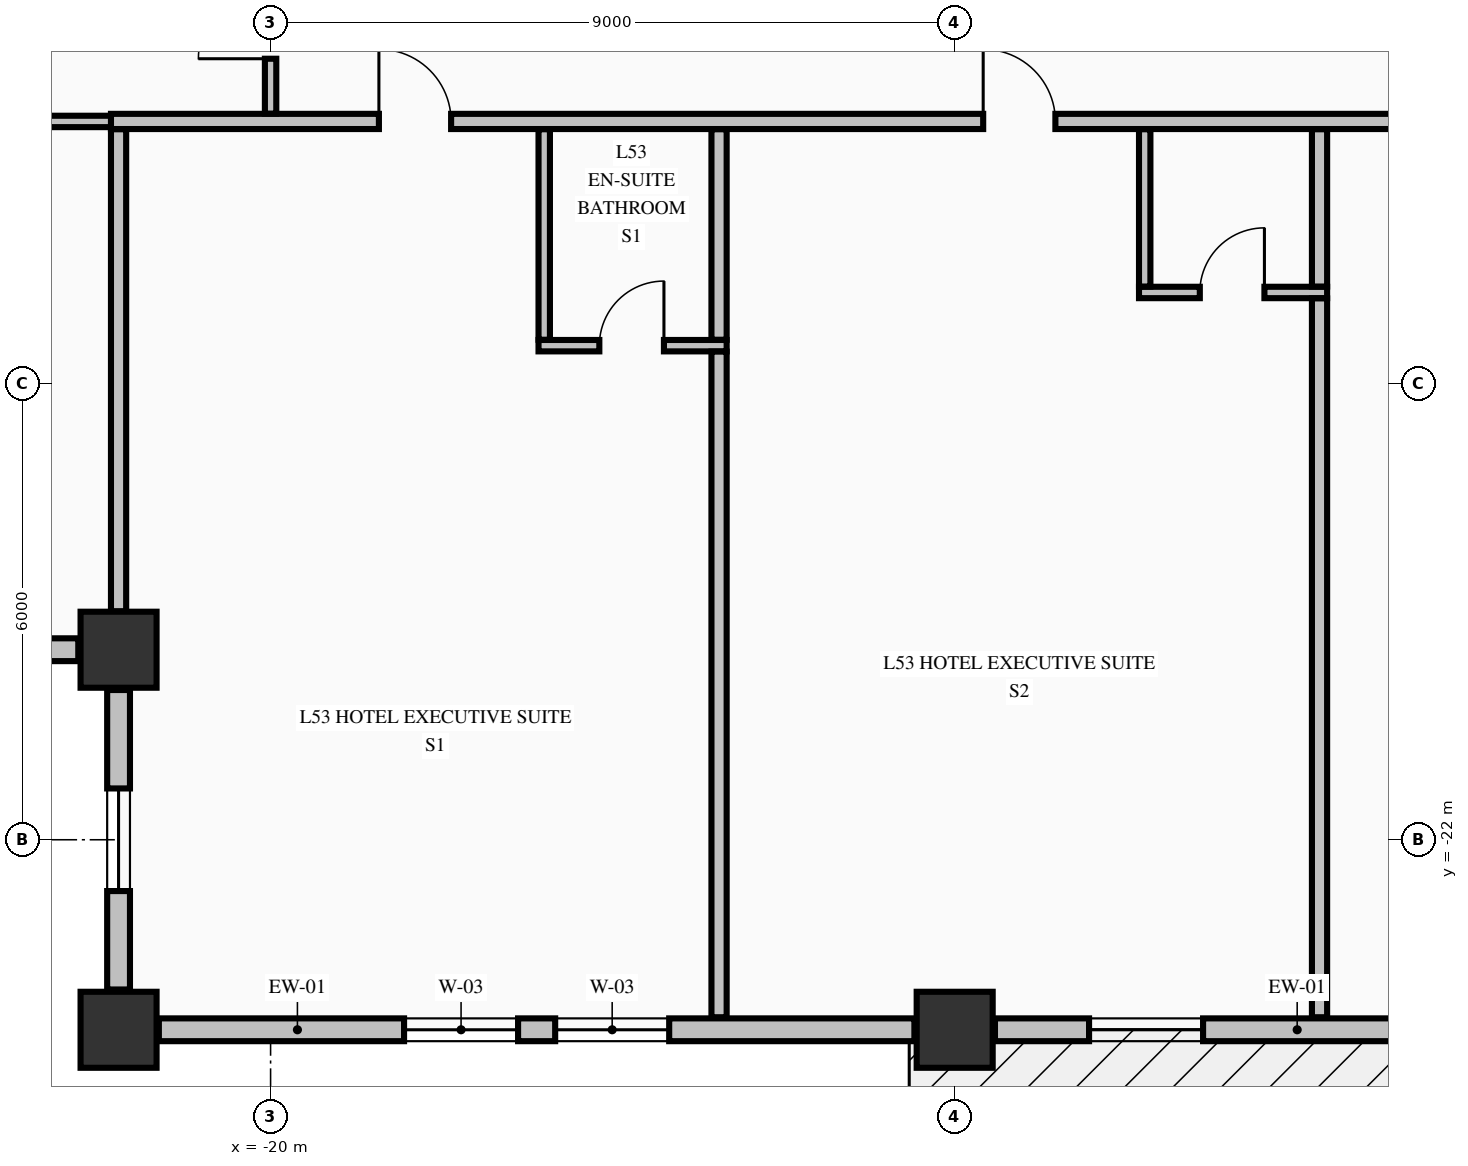
"""IFC4 building model, lengths in metres.
Left out: names, types, materials, properties, quantities, classifications, styles, units other than length and angle.
Written with IfcOpenShell. Run it as: python <this file> out.ifc"""

import sys

from ifc_helpers import new_model, si_unit, direction, frame, frame_2d, origin, origin_2d, place, context, subcontext, project, spatial, rectangle, extrude, element, fill, save


model = new_model("IFC4")
c1 = context("Model", 3, precision=1e-05, world=origin(), true_north=direction((0.0, 1.0)))
c2 = subcontext(c1, "Body", "Model", "MODEL_VIEW")
j1 = project(units=[si_unit("LENGTHUNIT", "METRE"), si_unit("PLANEANGLEUNIT", "RADIAN")], contexts=[c1])
p1 = place(None, origin())
s1 = spatial("IfcSite", under=j1, at=p1, CompositionType="ELEMENT")
p2 = place(p1, origin())
s2 = spatial("IfcBuilding", under=s1, at=p2, CompositionType="ELEMENT")
p3 = place(p2, frame((0.0, 0.0, 205.06)))
s3 = spatial("IfcBuildingStorey", under=s2, at=p3, CompositionType="ELEMENT", Elevation=205.06)
for number, where, z_axis, x_axis in (
    (1, (-22.0, -24.5, -0.25), (0.0, 0.0, 1.0), (1.0, 0.0, 0.0)),
    (2, (-11.0, -24.5, -0.25), (0.0, 0.0, 1.0), (1.0, 0.0, 0.0)),
    (3, (-22.0, -19.5, -0.25), (0.0, 0.0, 1.0), (1.0, 0.0, 0.0)),
):
    element("IfcColumn", number, at=place(p3, frame(where, z_axis=z_axis, x_axis=x_axis)), inside=s3, PredefinedType="COLUMN", context=c2, shape_type="SweptSolid", body=[
        extrude(rectangle(XDim=1.0, YDim=1.0, at=origin_2d()), origin(), (0.0, 0.0, 1.0), 3.4),
    ])
p4 = place(p3, frame((-26.47, -19.5, 0.0), z_axis=(0.0, 0.0, 1.0), x_axis=(1.0, 0.0, 0.0)))
e4 = element("IfcWall", 4, at=p4, inside=s3, PredefinedType="STANDARD", context=c2, shape_type="SweptSolid", body=[
    extrude(rectangle(XDim=3.94, YDim=0.3, at=frame_2d((1.97, 0.0))), origin(), (0.0, 0.0, 1.0), 2.542),
])
p5 = place(p4, frame((1.295, 0.0, 0.68)))
e5 = element("IfcOpeningElement", 5, at=p5, cuts=e4, PredefinedType="OPENING", context=c2, shape_type="SweptSolid", body=[
    extrude(rectangle(XDim=1.35, YDim=1.42, at=frame_2d((0.675, 0.71))), frame((0.0, 0.16, 0.0), z_axis=(0.0, -1.0, 0.0), x_axis=(1.0, 0.0, 0.0)), (0.0, 0.0, 1.0), 0.32),
])
p6 = place(p3, frame((-22.0, -20.03, 0.0), z_axis=(0.0, 0.0, 1.0), x_axis=(0.0, -1.0, 0.0)))
e6 = element("IfcWall", 6, at=p6, inside=s3, PredefinedType="STANDARD", context=c2, shape_type="SweptSolid", body=[
    extrude(rectangle(XDim=3.94, YDim=0.3, at=frame_2d((1.97, 0.0))), origin(), (0.0, 0.0, 1.0), 2.542),
])
p7 = place(p6, frame((1.295, 0.0, 0.68)))
e7 = element("IfcOpeningElement", 7, at=p7, cuts=e6, PredefinedType="OPENING", context=c2, shape_type="SweptSolid", body=[
    extrude(rectangle(XDim=1.35, YDim=1.42, at=frame_2d((0.675, 0.71))), frame((0.0, 0.16, 0.0), z_axis=(0.0, -1.0, 0.0), x_axis=(1.0, 0.0, 0.0)), (0.0, 0.0, 1.0), 0.32),
])
p8 = place(p3, frame((-21.47, -24.5, 0.0), z_axis=(0.0, 0.0, 1.0), x_axis=(1.0, 0.0, 0.0)))
e8 = element("IfcWall", 8, at=p8, inside=s3, PredefinedType="STANDARD", context=c2, shape_type="SweptSolid", body=[
    extrude(rectangle(XDim=9.94, YDim=0.3, at=frame_2d((4.97, 0.0))), origin(), (0.0, 0.0, 1.0), 2.542),
])
p9 = place(p8, frame((3.226, 0.0, 0.72)))
e9 = element("IfcOpeningElement", 9, at=p9, cuts=e8, PredefinedType="OPENING", context=c2, shape_type="SweptSolid", body=[
    extrude(rectangle(XDim=1.5, YDim=1.6, at=frame_2d((0.75, 0.8))), frame((0.0, 0.16, 0.0), z_axis=(0.0, -1.0, 0.0), x_axis=(1.0, 0.0, 0.0)), (0.0, 0.0, 1.0), 0.32),
])
p10 = place(p8, frame((5.214, 0.0, 0.72)))
e10 = element("IfcOpeningElement", 10, at=p10, cuts=e8, PredefinedType="OPENING", context=c2, shape_type="SweptSolid", body=[
    extrude(rectangle(XDim=1.5, YDim=1.6, at=frame_2d((0.75, 0.8))), frame((0.0, 0.16, 0.0), z_axis=(0.0, -1.0, 0.0), x_axis=(1.0, 0.0, 0.0)), (0.0, 0.0, 1.0), 0.32),
])
p11 = place(p3, frame((-10.47, -24.5, 0.0), z_axis=(0.0, 0.0, 1.0), x_axis=(1.0, 0.0, 0.0)))
e11 = element("IfcWall", 11, at=p11, inside=s3, PredefinedType="STANDARD", context=c2, shape_type="SweptSolid", body=[
    extrude(rectangle(XDim=9.94, YDim=0.3, at=frame_2d((4.97, 0.0))), origin(), (0.0, 0.0, 1.0), 2.542),
])
p12 = place(p11, frame((8.64, 0.0, 0.0)))
e12 = element("IfcOpeningElement", 12, at=p12, cuts=e11, PredefinedType="OPENING", context=c2, shape_type="SweptSolid", body=[
    extrude(rectangle(XDim=1.1, YDim=2.15, at=frame_2d((0.55, 1.075))), frame((0.0, 0.16, 0.0), z_axis=(0.0, -1.0, 0.0), x_axis=(1.0, 0.0, 0.0)), (0.0, 0.0, 1.0), 0.32),
])
p13 = place(p11, frame((1.238, 0.0, 0.72)))
e13 = element("IfcOpeningElement", 13, at=p13, cuts=e11, PredefinedType="OPENING", context=c2, shape_type="SweptSolid", body=[
    extrude(rectangle(XDim=1.5, YDim=1.6, at=frame_2d((0.75, 0.8))), frame((0.0, 0.16, 0.0), z_axis=(0.0, -1.0, 0.0), x_axis=(1.0, 0.0, 0.0)), (0.0, 0.0, 1.0), 0.32),
])
p14 = place(p11, frame((5.214, 0.0, 0.72)))
e14 = element("IfcOpeningElement", 14, at=p14, cuts=e11, PredefinedType="OPENING", context=c2, shape_type="SweptSolid", body=[
    extrude(rectangle(XDim=1.5, YDim=1.6, at=frame_2d((0.75, 0.8))), frame((0.0, 0.16, 0.0), z_axis=(0.0, -1.0, 0.0), x_axis=(1.0, 0.0, 0.0)), (0.0, 0.0, 1.0), 0.32),
])
p15 = place(p3, frame((-16.475, -15.5, 0.0), z_axis=(0.0, 0.0, 1.0), x_axis=(1.0, 0.0, 0.0)))
e15 = element("IfcWall", 15, at=p15, inside=s3, PredefinedType="PARTITIONING", context=c2, shape_type="SweptSolid", body=[
    extrude(rectangle(XDim=2.475, YDim=0.15, at=frame_2d((1.238, 0.0))), origin(), (0.0, 0.0, 1.0), 3.15),
])
p16 = place(p15, frame((0.8, 0.0, 0.0)))
e16 = element("IfcOpeningElement", 16, at=p16, cuts=e15, PredefinedType="OPENING", context=c2, shape_type="SweptSolid", body=[
    extrude(rectangle(XDim=0.85, YDim=2.1, at=frame_2d((0.425, 1.05))), frame((0.0, 0.085, 0.0), z_axis=(0.0, -1.0, 0.0), x_axis=(1.0, 0.0, 0.0)), (0.0, 0.0, 1.0), 0.17),
])
p17 = place(p3, frame((-8.575, -14.8, 0.0), z_axis=(0.0, 0.0, 1.0), x_axis=(1.0, 0.0, 0.0)))
e17 = element("IfcWall", 17, at=p17, inside=s3, PredefinedType="PARTITIONING", context=c2, shape_type="SweptSolid", body=[
    extrude(rectangle(XDim=2.475, YDim=0.15, at=frame_2d((1.237, 0.0))), origin(), (0.0, 0.0, 1.0), 3.15),
])
p18 = place(p17, frame((0.8, 0.0, 0.0)))
e18 = element("IfcOpeningElement", 18, at=p18, cuts=e17, PredefinedType="OPENING", context=c2, shape_type="SweptSolid", body=[
    extrude(rectangle(XDim=0.85, YDim=2.1, at=frame_2d((0.425, 1.05))), frame((0.0, 0.085, 0.0), z_axis=(0.0, -1.0, 0.0), x_axis=(1.0, 0.0, 0.0)), (0.0, 0.0, 1.0), 0.17),
])
p19 = place(p3, frame((-26.835, -12.55, 0.0), z_axis=(0.0, 0.0, 1.0), x_axis=(1.0, 0.0, 0.0)))
e19 = element("IfcWall", 19, at=p19, inside=s3, PredefinedType="PARTITIONING", context=c2, shape_type="SweptSolid", body=[
    extrude(rectangle(XDim=4.935, YDim=0.15, at=frame_2d((2.468, 0.0))), origin(), (0.0, 0.0, 1.0), 3.15),
])
p20 = place(p3, frame((-22.1, -12.55, 0.0), z_axis=(0.0, 0.0, 1.0), x_axis=(1.0, 0.0, 0.0)))
e20 = element("IfcWall", 20, at=p20, inside=s3, PredefinedType="PARTITIONING", context=c2, shape_type="SweptSolid", body=[
    extrude(rectangle(XDim=39.2, YDim=0.2, at=frame_2d((19.6, 0.0))), origin(), (0.0, 0.0, 1.0), 3.15),
])
p21 = place(p20, frame((3.525, 0.0, 0.0)))
e21 = element("IfcOpeningElement", 21, at=p21, cuts=e20, PredefinedType="OPENING", context=c2, shape_type="SweptSolid", body=[
    extrude(rectangle(XDim=0.95, YDim=2.15, at=frame_2d((0.475, 1.075))), frame((0.0, 0.11, 0.0), z_axis=(0.0, -1.0, 0.0), x_axis=(1.0, 0.0, 0.0)), (0.0, 0.0, 1.0), 0.22),
])
p22 = place(p20, frame((11.475, 0.0, 0.0)))
e22 = element("IfcOpeningElement", 22, at=p22, cuts=e20, PredefinedType="OPENING", context=c2, shape_type="SweptSolid", body=[
    extrude(rectangle(XDim=0.95, YDim=2.15, at=frame_2d((0.475, 1.075))), frame((0.0, 0.11, 0.0), z_axis=(0.0, -1.0, 0.0), x_axis=(1.0, 0.0, 0.0)), (0.0, 0.0, 1.0), 0.22),
])
p23 = place(p20, frame((19.775, 0.0, 0.0)))
e23 = element("IfcOpeningElement", 23, at=p23, cuts=e20, PredefinedType="OPENING", context=c2, shape_type="SweptSolid", body=[
    extrude(rectangle(XDim=0.95, YDim=2.15, at=frame_2d((0.475, 1.075))), frame((0.0, 0.11, 0.0), z_axis=(0.0, -1.0, 0.0), x_axis=(1.0, 0.0, 0.0)), (0.0, 0.0, 1.0), 0.22),
])
p24 = place(p20, frame((34.675, 0.0, 0.0)))
e24 = element("IfcOpeningElement", 24, at=p24, cuts=e20, PredefinedType="OPENING", context=c2, shape_type="SweptSolid", body=[
    extrude(rectangle(XDim=0.95, YDim=2.15, at=frame_2d((0.475, 1.075))), frame((0.0, 0.11, 0.0), z_axis=(0.0, -1.0, 0.0), x_axis=(1.0, 0.0, 0.0)), (0.0, 0.0, 1.0), 0.22),
])
p25 = place(p3, frame((-22.0, -18.994, 0.0), z_axis=(0.0, 0.0, 1.0), x_axis=(0.0, 1.0, 0.0)))
e25 = element("IfcWall", 25, at=p25, inside=s3, PredefinedType="PARTITIONING", context=c2, shape_type="SweptSolid", body=[
    extrude(rectangle(XDim=6.341, YDim=0.2, at=frame_2d((3.17, 0.0))), origin(), (0.0, 0.0, 1.0), 3.15),
])
p26 = place(p3, frame((-20.0, -12.447, 0.0), z_axis=(0.0, 0.0, 1.0), x_axis=(0.0, 1.0, 0.0)))
e26 = element("IfcWall", 26, at=p26, inside=s3, PredefinedType="PARTITIONING", context=c2, shape_type="SweptSolid", body=[
    extrude(rectangle(XDim=2.066, YDim=0.15, at=frame_2d((1.033, 0.0))), origin(), (0.0, 0.0, 1.0), 2.342),
])
p27 = place(p26, frame((0.722, 0.0, 0.0)))
e27 = element("IfcOpeningElement", 27, at=p27, cuts=e26, PredefinedType="OPENING", context=c2, shape_type="SweptSolid", body=[
    extrude(rectangle(XDim=0.95, YDim=2.15, at=frame_2d((0.475, 1.075))), frame((0.0, 0.085, 0.0), z_axis=(0.0, -1.0, 0.0), x_axis=(1.0, 0.0, 0.0)), (0.0, 0.0, 1.0), 0.17),
])
p28 = place(p3, frame((-16.4, -15.422, 0.0), z_axis=(0.0, 0.0, 1.0), x_axis=(0.0, 1.0, 0.0)))
e28 = element("IfcWall", 28, at=p28, inside=s3, PredefinedType="PARTITIONING", context=c2, shape_type="SweptSolid", body=[
    extrude(rectangle(XDim=2.769, YDim=0.15, at=frame_2d((1.385, 0.0))), origin(), (0.0, 0.0, 1.0), 3.15),
])
p29 = place(p3, frame((-14.1, -24.335, 0.0), z_axis=(0.0, 0.0, 1.0), x_axis=(0.0, 1.0, 0.0)))
e29 = element("IfcWall", 29, at=p29, inside=s3, PredefinedType="PARTITIONING", context=c2, shape_type="SweptSolid", body=[
    extrude(rectangle(XDim=8.757, YDim=0.2, at=frame_2d((4.378, 0.0))), origin(), (0.0, 0.0, 1.0), 3.15),
])
p30 = place(p3, frame((-14.1, -15.422, 0.0), z_axis=(0.0, 0.0, 1.0), x_axis=(0.0, 1.0, 0.0)))
e30 = element("IfcWall", 30, at=p30, inside=s3, PredefinedType="PARTITIONING", context=c2, shape_type="SweptSolid", body=[
    extrude(rectangle(XDim=2.769, YDim=0.2, at=frame_2d((1.385, 0.0))), origin(), (0.0, 0.0, 1.0), 3.15),
])
p31 = place(p3, frame((-8.5, -14.722, 0.0), z_axis=(0.0, 0.0, 1.0), x_axis=(0.0, 1.0, 0.0)))
e31 = element("IfcWall", 31, at=p31, inside=s3, PredefinedType="PARTITIONING", context=c2, shape_type="SweptSolid", body=[
    extrude(rectangle(XDim=2.069, YDim=0.15, at=frame_2d((1.034, 0.0))), origin(), (0.0, 0.0, 1.0), 3.15),
])
p32 = place(p3, frame((-6.2, -24.335, 0.0), z_axis=(0.0, 0.0, 1.0), x_axis=(0.0, 1.0, 0.0)))
e32 = element("IfcWall", 32, at=p32, inside=s3, PredefinedType="PARTITIONING", context=c2, shape_type="SweptSolid", body=[
    extrude(rectangle(XDim=9.457, YDim=0.2, at=frame_2d((4.729, 0.0))), origin(), (0.0, 0.0, 1.0), 3.15),
])
p33 = place(p3, frame((-6.2, -14.722, 0.0), z_axis=(0.0, 0.0, 1.0), x_axis=(0.0, 1.0, 0.0)))
e33 = element("IfcWall", 33, at=p33, inside=s3, PredefinedType="PARTITIONING", context=c2, shape_type="SweptSolid", body=[
    extrude(rectangle(XDim=2.069, YDim=0.2, at=frame_2d((1.034, 0.0))), origin(), (0.0, 0.0, 1.0), 3.15),
])
p34 = place(p7, origin())
e34 = element("IfcWindow", 34, at=p34, inside=s3, PartitioningType="SINGLE_PANEL", PredefinedType="WINDOW", context=c2, shape_type="SweptSolid", body=[
    extrude(rectangle(XDim=1.35, YDim=1.42, at=frame_2d((0.675, 0.71))), frame((0.0, 0.03, 0.0), z_axis=(0.0, -1.0, 0.0), x_axis=(1.0, 0.0, 0.0)), (0.0, 0.0, 1.0), 0.06),
])
fill(e7, e34)
p35 = place(p9, origin())
e35 = element("IfcWindow", 35, at=p35, inside=s3, PartitioningType="SINGLE_PANEL", PredefinedType="WINDOW", context=c2, shape_type="SweptSolid", body=[
    extrude(rectangle(XDim=1.5, YDim=1.6, at=frame_2d((0.75, 0.8))), frame((0.0, 0.03, 0.0), z_axis=(0.0, -1.0, 0.0), x_axis=(1.0, 0.0, 0.0)), (0.0, 0.0, 1.0), 0.06),
])
fill(e9, e35)
p36 = place(p10, origin())
e36 = element("IfcWindow", 36, at=p36, inside=s3, PartitioningType="SINGLE_PANEL", PredefinedType="WINDOW", context=c2, shape_type="SweptSolid", body=[
    extrude(rectangle(XDim=1.5, YDim=1.6, at=frame_2d((0.75, 0.8))), frame((0.0, 0.03, 0.0), z_axis=(0.0, -1.0, 0.0), x_axis=(1.0, 0.0, 0.0)), (0.0, 0.0, 1.0), 0.06),
])
fill(e10, e36)
p37 = place(p13, origin())
e37 = element("IfcWindow", 37, at=p37, inside=s3, PartitioningType="SINGLE_PANEL", PredefinedType="WINDOW", context=c2, shape_type="SweptSolid", body=[
    extrude(rectangle(XDim=1.5, YDim=1.6, at=frame_2d((0.75, 0.8))), frame((0.0, 0.03, 0.0), z_axis=(0.0, -1.0, 0.0), x_axis=(1.0, 0.0, 0.0)), (0.0, 0.0, 1.0), 0.06),
])
fill(e13, e37)
p38 = place(p21, origin())
e38 = element("IfcDoor", 38, at=p38, inside=s3, OperationType="SINGLE_SWING_LEFT", PredefinedType="DOOR", context=c2, shape_type="SweptSolid", body=[
    extrude(rectangle(XDim=0.95, YDim=2.15, at=frame_2d((0.475, 1.075))), frame((0.0, 0.025, 0.0), z_axis=(0.0, -1.0, 0.0), x_axis=(1.0, 0.0, 0.0)), (0.0, 0.0, 1.0), 0.05),
])
fill(e21, e38)
p39 = place(p16, origin())
e39 = element("IfcDoor", 39, at=p39, inside=s3, OperationType="SINGLE_SWING_RIGHT", PredefinedType="DOOR", context=c2, shape_type="SweptSolid", body=[
    extrude(rectangle(XDim=0.85, YDim=2.1, at=frame_2d((0.425, 1.05))), frame((0.0, 0.025, 0.0), z_axis=(0.0, -1.0, 0.0), x_axis=(1.0, 0.0, 0.0)), (0.0, 0.0, 1.0), 0.05),
])
fill(e16, e39)
p40 = place(p22, origin())
e40 = element("IfcDoor", 40, at=p40, inside=s3, OperationType="SINGLE_SWING_LEFT", PredefinedType="DOOR", context=c2, shape_type="SweptSolid", body=[
    extrude(rectangle(XDim=0.95, YDim=2.15, at=frame_2d((0.475, 1.075))), frame((0.0, 0.025, 0.0), z_axis=(0.0, -1.0, 0.0), x_axis=(1.0, 0.0, 0.0)), (0.0, 0.0, 1.0), 0.05),
])
fill(e22, e40)
p41 = place(p18, origin())
e41 = element("IfcDoor", 41, at=p41, inside=s3, OperationType="SINGLE_SWING_RIGHT", PredefinedType="DOOR", context=c2, shape_type="SweptSolid", body=[
    extrude(rectangle(XDim=0.85, YDim=2.1, at=frame_2d((0.425, 1.05))), frame((0.0, 0.025, 0.0), z_axis=(0.0, -1.0, 0.0), x_axis=(1.0, 0.0, 0.0)), (0.0, 0.0, 1.0), 0.05),
])
fill(e18, e41)
p42 = place(p27, origin())
e42 = element("IfcDoor", 42, at=p42, inside=s3, OperationType="SINGLE_SWING_LEFT", PredefinedType="DOOR", context=c2, shape_type="SweptSolid", body=[
    extrude(rectangle(XDim=0.95, YDim=2.15, at=frame_2d((0.475, 1.075))), frame((0.0, 0.025, 0.0), z_axis=(0.0, -1.0, 0.0), x_axis=(1.0, 0.0, 0.0)), (0.0, 0.0, 1.0), 0.05),
])
fill(e27, e42)
save(model, sys.argv[1])
